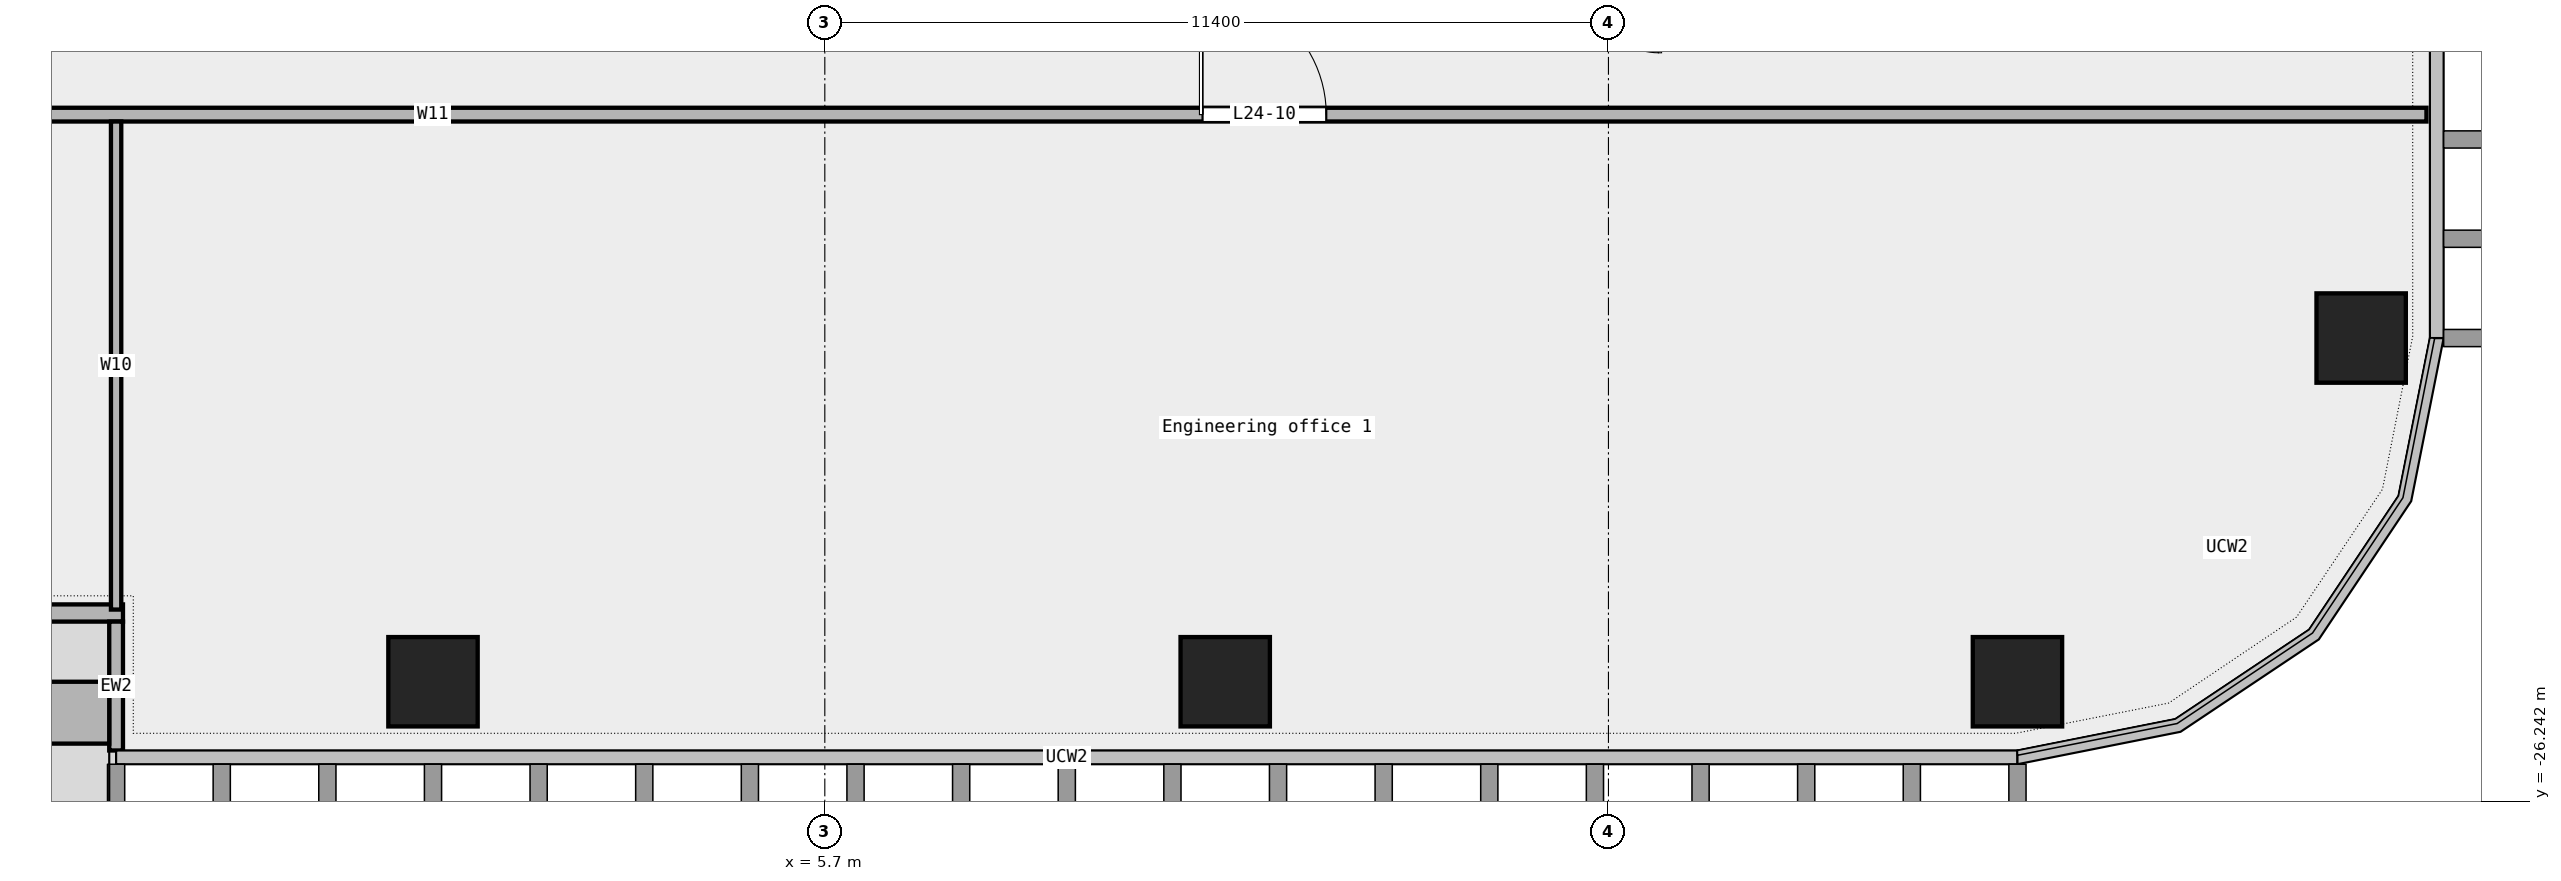
"""IFC4 building model, lengths in metres.
Left out: names, types, materials, properties, quantities, classifications, styles, units other than length and angle.
Written with IfcOpenShell. Run it as: python <this file> out.ifc"""

import sys

from ifc_helpers import new_model, si_unit, direction, frame, frame_2d, origin, origin_2d, place, context, subcontext, project, spatial, rectangle, extrude, element, fill, save


model = new_model("IFC4")
c1 = context("Model", 3, precision=1e-05, world=origin(), true_north=direction((0.0, 1.0)))
c2 = subcontext(c1, "Body", "Model", "MODEL_VIEW")
j1 = project(units=[si_unit("LENGTHUNIT", "METRE"), si_unit("PLANEANGLEUNIT", "RADIAN")], contexts=[c1])
p1 = place(None, origin())
s1 = spatial("IfcSite", under=j1, at=p1, CompositionType="ELEMENT")
p2 = place(p1, origin())
s2 = spatial("IfcBuilding", under=s1, at=p2, CompositionType="ELEMENT")
p3 = place(p2, frame((0.0, 0.0, 121.6)))
s3 = spatial("IfcBuildingStorey", under=s2, at=p3, CompositionType="ELEMENT", Elevation=121.6)
for number, where, z_axis, x_axis in (
    (1, (0.0, -24.5, 0.0), (0.0, 0.0, 1.0), (1.0, 0.0, 0.0)),
    (2, (11.525, -24.5, 0.0), (0.0, 0.0, 1.0), (1.0, 0.0, 0.0)),
    (3, (23.05, -24.5, 0.0), (0.0, 0.0, 1.0), (1.0, 0.0, 0.0)),
    (4, (28.05, -19.5, 0.0), (0.0, 0.0, 1.0), (1.0, 0.0, 0.0)),
):
    element("IfcColumn", number, at=place(p3, frame(where, z_axis=z_axis, x_axis=x_axis)), inside=s3, PredefinedType="COLUMN", context=c2, shape_type="SweptSolid", body=[
        extrude(rectangle(XDim=1.3, YDim=1.3, at=origin_2d()), origin(), (0.0, 0.0, 1.0), 4.05),
    ])
p4 = place(p3, frame((-18.54, -23.5, 0.0), z_axis=(0.0, 0.0, 1.0), x_axis=(1.0, 0.0, 0.0)))
e5 = element("IfcWall", 5, at=p4, inside=s3, PredefinedType="STANDARD", context=c2, shape_type="SweptSolid", body=[
    extrude(rectangle(XDim=14.03, YDim=0.25, at=frame_2d((7.015, 0.0))), origin(), (0.0, 0.0, 1.0), 4.05),
])
p5 = place(p4, frame((1.75, 0.0, 0.45)))
e6 = element("IfcOpeningElement", 6, at=p5, cuts=e5, PredefinedType="OPENING", context=c2, shape_type="SweptSolid", body=[
    extrude(rectangle(XDim=1.5, YDim=3.0, at=frame_2d((0.75, 1.5))), frame((0.0, 0.137, 0.0), z_axis=(0.0, -1.0, 0.0), x_axis=(1.0, 0.0, 0.0)), (0.0, 0.0, 1.0), 0.274),
])
p6 = place(p4, frame((4.25, 0.0, 0.0)))
e7 = element("IfcOpeningElement", 7, at=p6, cuts=e5, PredefinedType="OPENING", context=c2, shape_type="SweptSolid", body=[
    extrude(rectangle(XDim=1.8, YDim=2.4, at=frame_2d((0.9, 1.2))), frame((0.0, 0.137, 0.0), z_axis=(0.0, -1.0, 0.0), x_axis=(1.0, 0.0, 0.0)), (0.0, 0.0, 1.0), 0.274),
])
p7 = place(p4, frame((10.75, 0.0, 0.45)))
e8 = element("IfcOpeningElement", 8, at=p7, cuts=e5, PredefinedType="OPENING", context=c2, shape_type="SweptSolid", body=[
    extrude(rectangle(XDim=1.5, YDim=3.0, at=frame_2d((0.75, 1.5))), frame((0.0, 0.137, 0.0), z_axis=(0.0, -1.0, 0.0), x_axis=(1.0, 0.0, 0.0)), (0.0, 0.0, 1.0), 0.274),
])
p8 = place(p3, frame((-4.61, -25.5, 0.0), z_axis=(0.0, 0.0, 1.0), x_axis=(0.0, 1.0, 0.0)))
e9 = element("IfcWall", 9, at=p8, inside=s3, PredefinedType="STANDARD", context=c2, shape_type="SweptSolid", body=[
    extrude(rectangle(XDim=1.875, YDim=0.2, at=frame_2d((0.938, 0.0))), origin(), (0.0, 0.0, 1.0), 4.05),
])
p9 = place(p3, frame((-8.31, -24.95, 0.0), z_axis=(0.0, 0.0, 1.0), x_axis=(1.0, 0.0, 0.0)))
e10 = element("IfcWall", 10, at=p9, inside=s3, PredefinedType="STANDARD", context=c2, shape_type="SweptSolid", body=[
    extrude(rectangle(XDim=3.6, YDim=0.9, at=frame_2d((1.8, 0.0))), origin(), (0.0, 0.0, 1.0), 0.7),
])
p10 = place(p3, frame((-29.0, -16.25, 0.0), z_axis=(0.0, 0.0, 1.0), x_axis=(1.0, 0.0, 0.0)))
e11 = element("IfcWall", 11, at=p10, inside=s3, PredefinedType="PARTITIONING", context=c2, shape_type="SweptSolid", body=[
    extrude(rectangle(XDim=58.0, YDim=0.2, at=frame_2d((29.0, 0.0))), origin(), (0.0, 0.0, 1.0), 4.05),
])
p11 = place(p10, frame((16.725, 0.0, 0.0)))
e12 = element("IfcOpeningElement", 12, at=p11, cuts=e11, PredefinedType="OPENING", context=c2, shape_type="SweptSolid", body=[
    extrude(rectangle(XDim=1.5, YDim=2.1, at=frame_2d((0.75, 1.05))), frame((0.0, 0.112, 0.0), z_axis=(0.0, -1.0, 0.0), x_axis=(1.0, 0.0, 0.0)), (0.0, 0.0, 1.0), 0.224),
])
p12 = place(p10, frame((4.78, 0.0, 0.0)))
e13 = element("IfcOpeningElement", 13, at=p12, cuts=e11, PredefinedType="OPENING", context=c2, shape_type="SweptSolid", body=[
    extrude(rectangle(XDim=1.2, YDim=2.1, at=frame_2d((0.6, 1.05))), frame((0.0, 0.112, 0.0), z_axis=(0.0, -1.0, 0.0), x_axis=(1.0, 0.0, 0.0)), (0.0, 0.0, 1.0), 0.224),
])
p13 = place(p10, frame((40.195, 0.0, 0.0)))
e14 = element("IfcOpeningElement", 14, at=p13, cuts=e11, PredefinedType="OPENING", context=c2, shape_type="SweptSolid", body=[
    extrude(rectangle(XDim=1.8, YDim=2.1, at=frame_2d((0.9, 1.05))), frame((0.0, 0.112, 0.0), z_axis=(0.0, -1.0, 0.0), x_axis=(1.0, 0.0, 0.0)), (0.0, 0.0, 1.0), 0.224),
])
p14 = place(p3, frame((-4.61, -23.45, 0.0), z_axis=(0.0, 0.0, 1.0), x_axis=(0.0, 1.0, 0.0)))
e15 = element("IfcWall", 15, at=p14, inside=s3, PredefinedType="PARTITIONING", context=c2, shape_type="SweptSolid", body=[
    extrude(rectangle(XDim=7.1, YDim=0.15, at=frame_2d((3.55, 0.0))), origin(), (0.0, 0.0, 1.0), 4.05),
])
p15 = place(p13, origin())
e16 = element("IfcDoor", 16, at=p15, inside=s3, OperationType="DOUBLE_DOOR_SINGLE_SWING", PredefinedType="DOOR", context=c2, shape_type="SweptSolid", body=[
    extrude(rectangle(XDim=1.8, YDim=2.1, at=frame_2d((0.9, 1.05))), frame((0.0, 0.025, 0.0), z_axis=(0.0, -1.0, 0.0), x_axis=(1.0, 0.0, 0.0)), (0.0, 0.0, 1.0), 0.05),
])
fill(e14, e16)
save(model, sys.argv[1])
